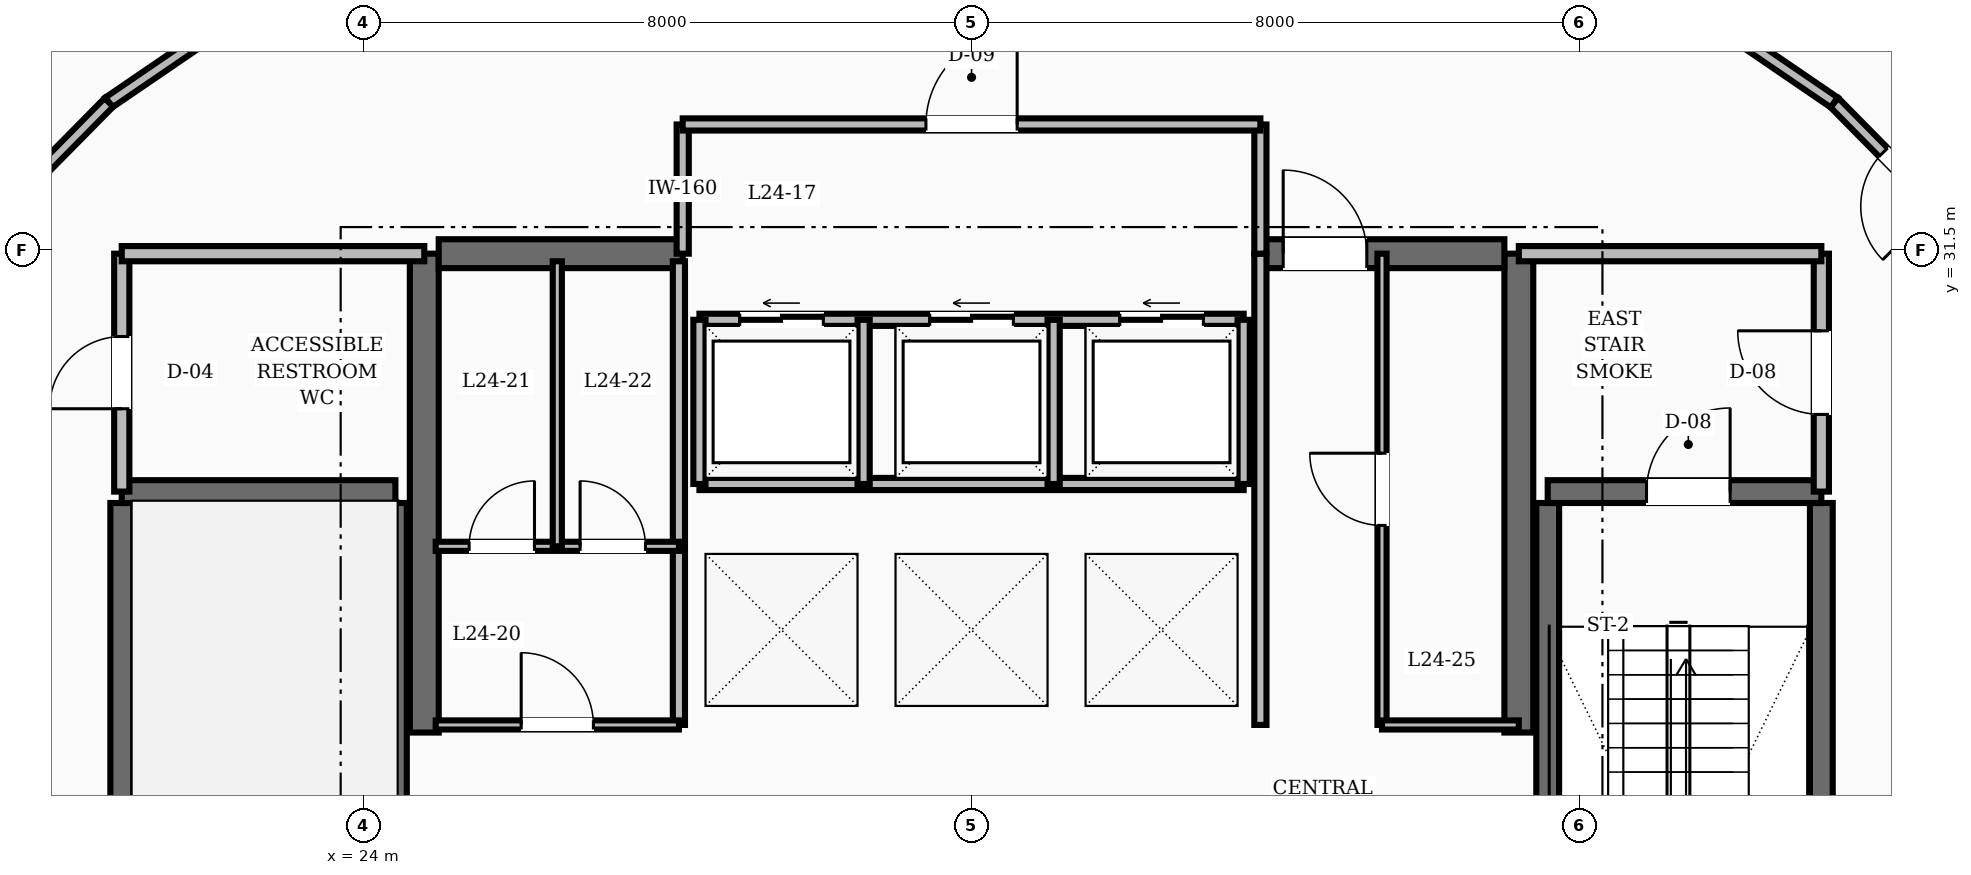
"""IFC4 building model, lengths in metres.
Left out: names, types, materials, properties, quantities, classifications, styles, units other than length and angle.
Written with IfcOpenShell. Run it as: python <this file> out.ifc"""

import sys

from ifc_helpers import new_model, si_unit, direction, frame, frame_2d, origin, place, context, subcontext, project, spatial, rectangle, extrude, element, fill, save


model = new_model("IFC4")
c1 = context("Model", 3, precision=1e-05, world=origin(), true_north=direction((0.0, 1.0)))
c2 = subcontext(c1, "Body", "Model", "MODEL_VIEW")
j1 = project(units=[si_unit("LENGTHUNIT", "METRE"), si_unit("PLANEANGLEUNIT", "RADIAN")], contexts=[c1])
p1 = place(None, origin())
s1 = spatial("IfcSite", under=j1, at=p1, CompositionType="ELEMENT")
p2 = place(p1, origin())
s2 = spatial("IfcBuilding", under=s1, at=p2, CompositionType="ELEMENT")
p3 = place(p2, frame((0.0, 0.0, 95.2)))
s3 = spatial("IfcBuildingStorey", under=s2, at=p3, CompositionType="ELEMENT", Elevation=95.2)
for number, where, z_axis, x_axis in (
    (1, (24.8, 25.15, 0.0), (0.0, 0.0, 1.0), (0.0, 1.0, 0.0)),
    (2, (39.2, 25.15, 0.0), (0.0, 0.0, 1.0), (0.0, 1.0, 0.0)),
):
    element("IfcWall", number, at=place(p3, frame(where, z_axis=z_axis, x_axis=x_axis)), inside=s3, PredefinedType="SHEAR", context=c2, shape_type="SweptSolid", body=[
        extrude(rectangle(XDim=6.3, YDim=0.38, at=frame_2d((3.15, 0.0))), origin(), (0.0, 0.0, 1.0), 3.6),
    ])
p4 = place(p3, frame((24.99, 31.45, 0.0), z_axis=(0.0, 0.0, 1.0), x_axis=(1.0, 0.0, 0.0)))
e3 = element("IfcWall", 3, at=p4, inside=s3, PredefinedType="SHEAR", context=c2, shape_type="SweptSolid", body=[
    extrude(rectangle(XDim=3.21, YDim=0.38, at=frame_2d((1.605, 0.0))), origin(), (0.0, 0.0, 1.0), 3.6),
])
p5 = place(p3, frame((35.8, 31.45, 0.0), z_axis=(0.0, 0.0, 1.0), x_axis=(1.0, 0.0, 0.0)))
e4 = element("IfcWall", 4, at=p5, inside=s3, PredefinedType="SHEAR", context=c2, shape_type="SweptSolid", body=[
    extrude(rectangle(XDim=3.21, YDim=0.38, at=frame_2d((1.605, 0.0))), origin(), (0.0, 0.0, 1.0), 3.6),
])
p6 = place(p5, frame((0.3, 0.0, 0.0)))
e5 = element("IfcOpeningElement", 5, at=p6, cuts=e4, PredefinedType="OPENING", context=c2, shape_type="SweptSolid", body=[
    extrude(rectangle(XDim=1.1, YDim=2.1, at=frame_2d((0.55, 1.05))), frame((0.0, 0.2, 0.0), z_axis=(0.0, -1.0, 0.0), x_axis=(1.0, 0.0, 0.0)), (0.0, 0.0, 1.0), 0.4),
])
for number, where, z_axis, x_axis in (
    (6, (20.82, 19.43, 0.0), (0.0, 0.0, 1.0), (0.0, 1.0, 0.0)),
    (7, (24.42, 19.43, 0.0), (0.0, 0.0, 1.0), (0.0, 1.0, 0.0)),
):
    element("IfcWall", number, at=place(p3, frame(where, z_axis=z_axis, x_axis=x_axis)), inside=s3, PredefinedType="SHEAR", context=c2, shape_type="SweptSolid", body=[
        extrude(rectangle(XDim=8.74, YDim=0.3, at=frame_2d((4.37, 0.0))), origin(), (0.0, 0.0, 1.0), 3.6),
    ])
p7 = place(p3, frame((20.82, 28.32, 0.0), z_axis=(0.0, 0.0, 1.0), x_axis=(1.0, 0.0, 0.0)))
e8 = element("IfcWall", 8, at=p7, inside=s3, PredefinedType="SHEAR", context=c2, shape_type="SweptSolid", body=[
    extrude(rectangle(XDim=3.6, YDim=0.3, at=frame_2d((1.8, 0.0))), origin(), (0.0, 0.0, 1.0), 3.6),
])
for number, where, z_axis, x_axis in (
    (9, (43.18, 19.43, 0.0), (0.0, 0.0, 1.0), (0.0, 1.0, 0.0)),
    (10, (39.58, 19.43, 0.0), (0.0, 0.0, 1.0), (0.0, 1.0, 0.0)),
):
    element("IfcWall", number, at=place(p3, frame(where, z_axis=z_axis, x_axis=x_axis)), inside=s3, PredefinedType="SHEAR", context=c2, shape_type="SweptSolid", body=[
        extrude(rectangle(XDim=8.74, YDim=0.3, at=frame_2d((4.37, 0.0))), origin(), (0.0, 0.0, 1.0), 3.6),
    ])
p8 = place(p3, frame((39.58, 28.32, 0.0), z_axis=(0.0, 0.0, 1.0), x_axis=(1.0, 0.0, 0.0)))
e11 = element("IfcWall", 11, at=p8, inside=s3, PredefinedType="SHEAR", context=c2, shape_type="SweptSolid", body=[
    extrude(rectangle(XDim=3.6, YDim=0.3, at=frame_2d((1.8, 0.0))), origin(), (0.0, 0.0, 1.0), 3.6),
])
p9 = place(p8, frame((1.3, 0.0, 0.0)))
e12 = element("IfcOpeningElement", 12, at=p9, cuts=e11, PredefinedType="OPENING", context=c2, shape_type="SweptSolid", body=[
    extrude(rectangle(XDim=1.1, YDim=2.1, at=frame_2d((0.55, 1.05))), frame((0.0, 0.16, 0.0), z_axis=(0.0, -1.0, 0.0), x_axis=(1.0, 0.0, 0.0)), (0.0, 0.0, 1.0), 0.32),
])
p10 = place(p3, frame((43.18, 28.32, 0.0), z_axis=(0.0, 0.0, 1.0), x_axis=(0.0, 1.0, 0.0)))
e13 = element("IfcWall", 13, at=p10, inside=s3, PredefinedType="SOLIDWALL", context=c2, shape_type="SweptSolid", body=[
    extrude(rectangle(XDim=3.13, YDim=0.2, at=frame_2d((1.565, 0.0))), origin(), (0.0, 0.0, 1.0), 2.71),
])
p11 = place(p10, frame((1.015, 0.0, 0.0)))
e14 = element("IfcOpeningElement", 14, at=p11, cuts=e13, PredefinedType="OPENING", context=c2, shape_type="SweptSolid", body=[
    extrude(rectangle(XDim=1.1, YDim=2.1, at=frame_2d((0.55, 1.05))), frame((0.0, 0.11, 0.0), z_axis=(0.0, -1.0, 0.0), x_axis=(1.0, 0.0, 0.0)), (0.0, 0.0, 1.0), 0.22),
])
p12 = place(p3, frame((39.2, 31.45, 0.0), z_axis=(0.0, 0.0, 1.0), x_axis=(1.0, 0.0, 0.0)))
e15 = element("IfcWall", 15, at=p12, inside=s3, PredefinedType="SOLIDWALL", context=c2, shape_type="SweptSolid", body=[
    extrude(rectangle(XDim=3.98, YDim=0.2, at=frame_2d((1.99, 0.0))), origin(), (0.0, 0.0, 1.0), 2.71),
])
p13 = place(p3, frame((20.82, 28.32, 0.0), z_axis=(0.0, 0.0, 1.0), x_axis=(0.0, 1.0, 0.0)))
e16 = element("IfcWall", 16, at=p13, inside=s3, PredefinedType="SOLIDWALL", context=c2, shape_type="SweptSolid", body=[
    extrude(rectangle(XDim=3.13, YDim=0.2, at=frame_2d((1.565, 0.0))), origin(), (0.0, 0.0, 1.0), 2.71),
])
p14 = place(p13, frame((1.09, 0.0, 0.0)))
e17 = element("IfcOpeningElement", 17, at=p14, cuts=e16, PredefinedType="OPENING", context=c2, shape_type="SweptSolid", body=[
    extrude(rectangle(XDim=0.95, YDim=2.1, at=frame_2d((0.475, 1.05))), frame((0.0, 0.11, 0.0), z_axis=(0.0, -1.0, 0.0), x_axis=(1.0, 0.0, 0.0)), (0.0, 0.0, 1.0), 0.22),
])
p15 = place(p3, frame((20.82, 31.45, 0.0), z_axis=(0.0, 0.0, 1.0), x_axis=(1.0, 0.0, 0.0)))
e18 = element("IfcWall", 18, at=p15, inside=s3, PredefinedType="SOLIDWALL", context=c2, shape_type="SweptSolid", body=[
    extrude(rectangle(XDim=3.98, YDim=0.2, at=frame_2d((1.99, 0.0))), origin(), (0.0, 0.0, 1.0), 2.71),
])
p16 = place(p3, frame((35.8, 25.25, 0.0), z_axis=(0.0, 0.0, 1.0), x_axis=(0.0, 1.0, 0.0)))
e19 = element("IfcWall", 19, at=p16, inside=s3, PredefinedType="SOLIDWALL", context=c2, shape_type="SweptSolid", body=[
    extrude(rectangle(XDim=6.2, YDim=0.16, at=frame_2d((3.1, 0.0))), origin(), (0.0, 0.0, 1.0), 2.71),
])
p17 = place(p3, frame((28.42, 30.58, 0.0), z_axis=(0.0, 0.0, 1.0), x_axis=(1.0, 0.0, 0.0)))
e20 = element("IfcWall", 20, at=p17, inside=s3, PredefinedType="SOLIDWALL", context=c2, shape_type="SweptSolid", body=[
    extrude(rectangle(XDim=7.16, YDim=0.16, at=frame_2d((3.58, 0.0))), origin(), (0.0, 0.0, 1.0), 2.71),
])
p18 = place(p17, frame((0.53, 0.0, 0.0)))
e21 = element("IfcOpeningElement", 21, at=p18, cuts=e20, PredefinedType="OPENING", context=c2, shape_type="SweptSolid", body=[
    extrude(rectangle(XDim=1.1, YDim=2.15, at=frame_2d((0.55, 1.075))), frame((0.0, 0.09, 0.0), z_axis=(0.0, -1.0, 0.0), x_axis=(1.0, 0.0, 0.0)), (0.0, 0.0, 1.0), 0.18),
])
p19 = place(p17, frame((3.03, 0.0, 0.0)))
e22 = element("IfcOpeningElement", 22, at=p19, cuts=e20, PredefinedType="OPENING", context=c2, shape_type="SweptSolid", body=[
    extrude(rectangle(XDim=1.1, YDim=2.15, at=frame_2d((0.55, 1.075))), frame((0.0, 0.09, 0.0), z_axis=(0.0, -1.0, 0.0), x_axis=(1.0, 0.0, 0.0)), (0.0, 0.0, 1.0), 0.18),
])
p20 = place(p17, frame((5.53, 0.0, 0.0)))
e23 = element("IfcOpeningElement", 23, at=p20, cuts=e20, PredefinedType="OPENING", context=c2, shape_type="SweptSolid", body=[
    extrude(rectangle(XDim=1.1, YDim=2.15, at=frame_2d((0.55, 1.075))), frame((0.0, 0.09, 0.0), z_axis=(0.0, -1.0, 0.0), x_axis=(1.0, 0.0, 0.0)), (0.0, 0.0, 1.0), 0.18),
])
p21 = place(p3, frame((28.42, 28.42, 0.0), z_axis=(0.0, 0.0, 1.0), x_axis=(1.0, 0.0, 0.0)))
e24 = element("IfcWall", 24, at=p21, inside=s3, PredefinedType="SOLIDWALL", context=c2, shape_type="SweptSolid", body=[
    extrude(rectangle(XDim=7.16, YDim=0.16, at=frame_2d((3.58, 0.0))), origin(), (0.0, 0.0, 1.0), 2.71),
])
for number, where, z_axis, x_axis in (
    (25, (28.42, 28.42, 0.0), (0.0, 0.0, 1.0), (0.0, 1.0, 0.0)),
    (26, (30.58, 28.42, 0.0), (0.0, 0.0, 1.0), (0.0, 1.0, 0.0)),
    (27, (33.08, 28.42, 0.0), (0.0, 0.0, 1.0), (0.0, 1.0, 0.0)),
    (28, (35.58, 28.42, 0.0), (0.0, 0.0, 1.0), (0.0, 1.0, 0.0)),
):
    element("IfcWall", number, at=place(p3, frame(where, z_axis=z_axis, x_axis=x_axis)), inside=s3, PredefinedType="SOLIDWALL", context=c2, shape_type="SweptSolid", body=[
        extrude(rectangle(XDim=2.16, YDim=0.16, at=frame_2d((1.08, 0.0))), origin(), (0.0, 0.0, 1.0), 2.71),
    ])
for number, where, z_axis, x_axis in (
    (29, (28.2, 31.45, 0.0), (0.0, 0.0, 1.0), (0.0, 1.0, 0.0)),
    (30, (35.8, 31.45, 0.0), (0.0, 0.0, 1.0), (0.0, 1.0, 0.0)),
):
    element("IfcWall", number, at=place(p3, frame(where, z_axis=z_axis, x_axis=x_axis)), inside=s3, PredefinedType="SOLIDWALL", context=c2, shape_type="SweptSolid", body=[
        extrude(rectangle(XDim=1.7, YDim=0.16, at=frame_2d((0.85, 0.0))), origin(), (0.0, 0.0, 1.0), 2.71),
    ])
p22 = place(p3, frame((28.2, 33.15, 0.0), z_axis=(0.0, 0.0, 1.0), x_axis=(1.0, 0.0, 0.0)))
e31 = element("IfcWall", 31, at=p22, inside=s3, PredefinedType="SOLIDWALL", context=c2, shape_type="SweptSolid", body=[
    extrude(rectangle(XDim=7.6, YDim=0.16, at=frame_2d((3.8, 0.0))), origin(), (0.0, 0.0, 1.0), 2.71),
])
p23 = place(p22, frame((3.2, 0.0, 0.0)))
e32 = element("IfcOpeningElement", 32, at=p23, cuts=e31, PredefinedType="OPENING", context=c2, shape_type="SweptSolid", body=[
    extrude(rectangle(XDim=1.2, YDim=2.1, at=frame_2d((0.6, 1.05))), frame((0.0, 0.09, 0.0), z_axis=(0.0, -1.0, 0.0), x_axis=(1.0, 0.0, 0.0)), (0.0, 0.0, 1.0), 0.18),
])
p24 = place(p3, frame((28.15, 25.25, 0.0), z_axis=(0.0, 0.0, 1.0), x_axis=(0.0, 1.0, 0.0)))
e33 = element("IfcWall", 33, at=p24, inside=s3, PredefinedType="SOLIDWALL", context=c2, shape_type="SweptSolid", body=[
    extrude(rectangle(XDim=6.1, YDim=0.16, at=frame_2d((3.05, 0.0))), origin(), (0.0, 0.0, 1.0), 2.71),
])
p25 = place(p3, frame((24.95, 25.25, 0.0), z_axis=(0.0, 0.0, 1.0), x_axis=(1.0, 0.0, 0.0)))
e34 = element("IfcWall", 34, at=p25, inside=s3, PredefinedType="PARTITIONING", context=c2, shape_type="SweptSolid", body=[
    extrude(rectangle(XDim=3.2, YDim=0.12, at=frame_2d((1.6, 0.0))), origin(), (0.0, 0.0, 1.0), 2.71),
])
p26 = place(p25, frame((1.125, 0.0, 0.0)))
e35 = element("IfcOpeningElement", 35, at=p26, cuts=e34, PredefinedType="OPENING", context=c2, shape_type="SweptSolid", body=[
    extrude(rectangle(XDim=0.95, YDim=2.1, at=frame_2d((0.475, 1.05))), frame((0.0, 0.07, 0.0), z_axis=(0.0, -1.0, 0.0), x_axis=(1.0, 0.0, 0.0)), (0.0, 0.0, 1.0), 0.14),
])
p27 = place(p3, frame((37.4, 25.25, 0.0), z_axis=(0.0, 0.0, 1.0), x_axis=(0.0, 1.0, 0.0)))
e36 = element("IfcWall", 36, at=p27, inside=s3, PredefinedType="PARTITIONING", context=c2, shape_type="SweptSolid", body=[
    extrude(rectangle(XDim=6.2, YDim=0.12, at=frame_2d((3.1, 0.0))), origin(), (0.0, 0.0, 1.0), 2.71),
])
p28 = place(p27, frame((2.625, 0.0, 0.0)))
e37 = element("IfcOpeningElement", 37, at=p28, cuts=e36, PredefinedType="OPENING", context=c2, shape_type="SweptSolid", body=[
    extrude(rectangle(XDim=0.95, YDim=2.1, at=frame_2d((0.475, 1.05))), frame((0.0, 0.07, 0.0), z_axis=(0.0, -1.0, 0.0), x_axis=(1.0, 0.0, 0.0)), (0.0, 0.0, 1.0), 0.14),
])
p29 = place(p3, frame((37.4, 25.25, 0.0), z_axis=(0.0, 0.0, 1.0), x_axis=(1.0, 0.0, 0.0)))
e38 = element("IfcWall", 38, at=p29, inside=s3, PredefinedType="PARTITIONING", context=c2, shape_type="SweptSolid", body=[
    extrude(rectangle(XDim=1.8, YDim=0.12, at=frame_2d((0.9, 0.0))), origin(), (0.0, 0.0, 1.0), 2.71),
])
p30 = place(p3, frame((24.95, 27.6, 0.0), z_axis=(0.0, 0.0, 1.0), x_axis=(1.0, 0.0, 0.0)))
e39 = element("IfcWall", 39, at=p30, inside=s3, PredefinedType="PARTITIONING", context=c2, shape_type="SweptSolid", body=[
    extrude(rectangle(XDim=3.2, YDim=0.12, at=frame_2d((1.6, 0.0))), origin(), (0.0, 0.0, 1.0), 2.71),
])
p31 = place(p30, frame((0.44, 0.0, 0.0)))
e40 = element("IfcOpeningElement", 40, at=p31, cuts=e39, PredefinedType="OPENING", context=c2, shape_type="SweptSolid", body=[
    extrude(rectangle(XDim=0.86, YDim=2.1, at=frame_2d((0.43, 1.05))), frame((0.0, 0.07, 0.0), z_axis=(0.0, -1.0, 0.0), x_axis=(1.0, 0.0, 0.0)), (0.0, 0.0, 1.0), 0.14),
])
p32 = place(p30, frame((1.9, 0.0, 0.0)))
e41 = element("IfcOpeningElement", 41, at=p32, cuts=e39, PredefinedType="OPENING", context=c2, shape_type="SweptSolid", body=[
    extrude(rectangle(XDim=0.86, YDim=2.1, at=frame_2d((0.43, 1.05))), frame((0.0, 0.07, 0.0), z_axis=(0.0, -1.0, 0.0), x_axis=(1.0, 0.0, 0.0)), (0.0, 0.0, 1.0), 0.14),
])
p33 = place(p3, frame((26.55, 27.6, 0.0), z_axis=(0.0, 0.0, 1.0), x_axis=(0.0, 1.0, 0.0)))
e42 = element("IfcWall", 42, at=p33, inside=s3, PredefinedType="PARTITIONING", context=c2, shape_type="SweptSolid", body=[
    extrude(rectangle(XDim=3.75, YDim=0.12, at=frame_2d((1.875, 0.0))), origin(), (0.0, 0.0, 1.0), 2.71),
])
p34 = place(p3, frame((45.345, 31.417, 0.0), z_axis=(0.0, 0.0, 1.0), x_axis=(-0.702366174226, 0.711815816981, 0.0)))
e43 = element("IfcWall", 43, at=p34, inside=s3, PredefinedType="SOLIDWALL", context=c2, shape_type="SweptSolid", body=[
    extrude(rectangle(XDim=2.842, YDim=0.16, at=frame_2d((1.421, 0.0))), origin(), (0.0, 0.0, 1.0), 2.71),
])
p35 = place(p34, frame((0.921, 0.0, 0.0)))
e44 = element("IfcOpeningElement", 44, at=p35, cuts=e43, PredefinedType="OPENING", context=c2, shape_type="SweptSolid", body=[
    extrude(rectangle(XDim=1.0, YDim=2.1, at=frame_2d((0.5, 1.05))), frame((0.0, 0.09, 0.0), z_axis=(0.0, -1.0, 0.0), x_axis=(1.0, 0.0, 0.0)), (0.0, 0.0, 1.0), 0.18),
])
for number, where, z_axis, x_axis in (
    (45, (43.349, 33.44, 0.0), (0.0, 0.0, 1.0), (-0.826, 0.564, 0.0)),
    (46, (23.083, 35.1, 0.0), (0.0, 0.0, 1.0), (-0.826, -0.564, 0.0)),
):
    element("IfcWall", number, at=place(p3, frame(where, z_axis=z_axis, x_axis=x_axis)), inside=s3, PredefinedType="SOLIDWALL", context=c2, shape_type="SweptSolid", body=[
        extrude(rectangle(XDim=2.945, YDim=0.16, at=frame_2d((1.472, 0.0))), origin(), (0.0, 0.0, 1.0), 2.71),
    ])
p36 = place(p3, frame((20.651, 33.44, 0.0), z_axis=(0.0, 0.0, 1.0), x_axis=(-0.702366174226, -0.711815816981, 0.0)))
e47 = element("IfcWall", 47, at=p36, inside=s3, PredefinedType="SOLIDWALL", context=c2, shape_type="SweptSolid", body=[
    extrude(rectangle(XDim=2.842, YDim=0.16, at=frame_2d((1.421, 0.0))), origin(), (0.0, 0.0, 1.0), 2.71),
])
p37 = place(p9, origin())
e48 = element("IfcDoor", 48, at=p37, inside=s3, OperationType="SINGLE_SWING_RIGHT", PredefinedType="DOOR", context=c2, shape_type="SweptSolid", body=[
    extrude(rectangle(XDim=1.1, YDim=2.1, at=frame_2d((0.55, 1.05))), frame((0.0, 0.025, 0.0), z_axis=(0.0, -1.0, 0.0), x_axis=(1.0, 0.0, 0.0)), (0.0, 0.0, 1.0), 0.05),
])
fill(e12, e48)
p38 = place(p11, origin())
e49 = element("IfcDoor", 49, at=p38, inside=s3, OperationType="SINGLE_SWING_RIGHT", PredefinedType="DOOR", context=c2, shape_type="SweptSolid", body=[
    extrude(rectangle(XDim=1.1, YDim=2.1, at=frame_2d((0.55, 1.05))), frame((0.0, 0.025, 0.0), z_axis=(0.0, -1.0, 0.0), x_axis=(1.0, 0.0, 0.0)), (0.0, 0.0, 1.0), 0.05),
])
fill(e14, e49)
p39 = place(p14, origin())
e50 = element("IfcDoor", 50, at=p39, inside=s3, OperationType="SINGLE_SWING_LEFT", PredefinedType="DOOR", context=c2, shape_type="SweptSolid", body=[
    extrude(rectangle(XDim=0.95, YDim=2.1, at=frame_2d((0.475, 1.05))), frame((0.0, 0.025, 0.0), z_axis=(0.0, -1.0, 0.0), x_axis=(1.0, 0.0, 0.0)), (0.0, 0.0, 1.0), 0.05),
])
fill(e17, e50)
p40 = place(p6, origin())
e51 = element("IfcDoor", 51, at=p40, inside=s3, OperationType="SINGLE_SWING_LEFT", PredefinedType="DOOR", context=c2, shape_type="SweptSolid", body=[
    extrude(rectangle(XDim=1.1, YDim=2.1, at=frame_2d((0.55, 1.05))), frame((0.0, 0.025, 0.0), z_axis=(0.0, -1.0, 0.0), x_axis=(1.0, 0.0, 0.0)), (0.0, 0.0, 1.0), 0.05),
])
fill(e5, e51)
p41 = place(p18, origin())
e52 = element("IfcDoor", 52, at=p41, inside=s3, OperationType="SLIDING_TO_LEFT", PredefinedType="DOOR", context=c2, shape_type="SweptSolid", body=[
    extrude(rectangle(XDim=1.1, YDim=2.15, at=frame_2d((0.55, 1.075))), frame((0.0, 0.025, 0.0), z_axis=(0.0, -1.0, 0.0), x_axis=(1.0, 0.0, 0.0)), (0.0, 0.0, 1.0), 0.05),
])
fill(e21, e52)
p42 = place(p19, origin())
e53 = element("IfcDoor", 53, at=p42, inside=s3, OperationType="SLIDING_TO_LEFT", PredefinedType="DOOR", context=c2, shape_type="SweptSolid", body=[
    extrude(rectangle(XDim=1.1, YDim=2.15, at=frame_2d((0.55, 1.075))), frame((0.0, 0.025, 0.0), z_axis=(0.0, -1.0, 0.0), x_axis=(1.0, 0.0, 0.0)), (0.0, 0.0, 1.0), 0.05),
])
fill(e22, e53)
p43 = place(p20, origin())
e54 = element("IfcDoor", 54, at=p43, inside=s3, OperationType="SLIDING_TO_LEFT", PredefinedType="DOOR", context=c2, shape_type="SweptSolid", body=[
    extrude(rectangle(XDim=1.1, YDim=2.15, at=frame_2d((0.55, 1.075))), frame((0.0, 0.025, 0.0), z_axis=(0.0, -1.0, 0.0), x_axis=(1.0, 0.0, 0.0)), (0.0, 0.0, 1.0), 0.05),
])
fill(e23, e54)
p44 = place(p23, origin())
e55 = element("IfcDoor", 55, at=p44, inside=s3, OperationType="SINGLE_SWING_RIGHT", PredefinedType="DOOR", context=c2, shape_type="SweptSolid", body=[
    extrude(rectangle(XDim=1.2, YDim=2.1, at=frame_2d((0.6, 1.05))), frame((0.0, 0.025, 0.0), z_axis=(0.0, -1.0, 0.0), x_axis=(1.0, 0.0, 0.0)), (0.0, 0.0, 1.0), 0.05),
])
fill(e32, e55)
p45 = place(p26, origin())
e56 = element("IfcDoor", 56, at=p45, inside=s3, OperationType="SINGLE_SWING_LEFT", PredefinedType="DOOR", context=c2, shape_type="SweptSolid", body=[
    extrude(rectangle(XDim=0.95, YDim=2.1, at=frame_2d((0.475, 1.05))), frame((0.0, 0.025, 0.0), z_axis=(0.0, -1.0, 0.0), x_axis=(1.0, 0.0, 0.0)), (0.0, 0.0, 1.0), 0.05),
])
fill(e35, e56)
p46 = place(p31, origin())
e57 = element("IfcDoor", 57, at=p46, inside=s3, OperationType="SINGLE_SWING_RIGHT", PredefinedType="DOOR", context=c2, shape_type="SweptSolid", body=[
    extrude(rectangle(XDim=0.86, YDim=2.1, at=frame_2d((0.43, 1.05))), frame((0.0, 0.025, 0.0), z_axis=(0.0, -1.0, 0.0), x_axis=(1.0, 0.0, 0.0)), (0.0, 0.0, 1.0), 0.05),
])
fill(e40, e57)
p47 = place(p32, origin())
e58 = element("IfcDoor", 58, at=p47, inside=s3, OperationType="SINGLE_SWING_LEFT", PredefinedType="DOOR", context=c2, shape_type="SweptSolid", body=[
    extrude(rectangle(XDim=0.86, YDim=2.1, at=frame_2d((0.43, 1.05))), frame((0.0, 0.025, 0.0), z_axis=(0.0, -1.0, 0.0), x_axis=(1.0, 0.0, 0.0)), (0.0, 0.0, 1.0), 0.05),
])
fill(e41, e58)
p48 = place(p28, origin())
e59 = element("IfcDoor", 59, at=p48, inside=s3, OperationType="SINGLE_SWING_RIGHT", PredefinedType="DOOR", context=c2, shape_type="SweptSolid", body=[
    extrude(rectangle(XDim=0.95, YDim=2.1, at=frame_2d((0.475, 1.05))), frame((0.0, 0.025, 0.0), z_axis=(0.0, -1.0, 0.0), x_axis=(1.0, 0.0, 0.0)), (0.0, 0.0, 1.0), 0.05),
])
fill(e37, e59)
p49 = place(p35, origin())
e60 = element("IfcDoor", 60, at=p49, inside=s3, OperationType="SINGLE_SWING_LEFT", PredefinedType="DOOR", context=c2, shape_type="SweptSolid", body=[
    extrude(rectangle(XDim=1.0, YDim=2.1, at=frame_2d((0.5, 1.05))), frame((0.0, 0.025, 0.0), z_axis=(0.0, -1.0, 0.0), x_axis=(1.0, 0.0, 0.0)), (0.0, 0.0, 1.0), 0.05),
])
fill(e44, e60)
save(model, sys.argv[1])
